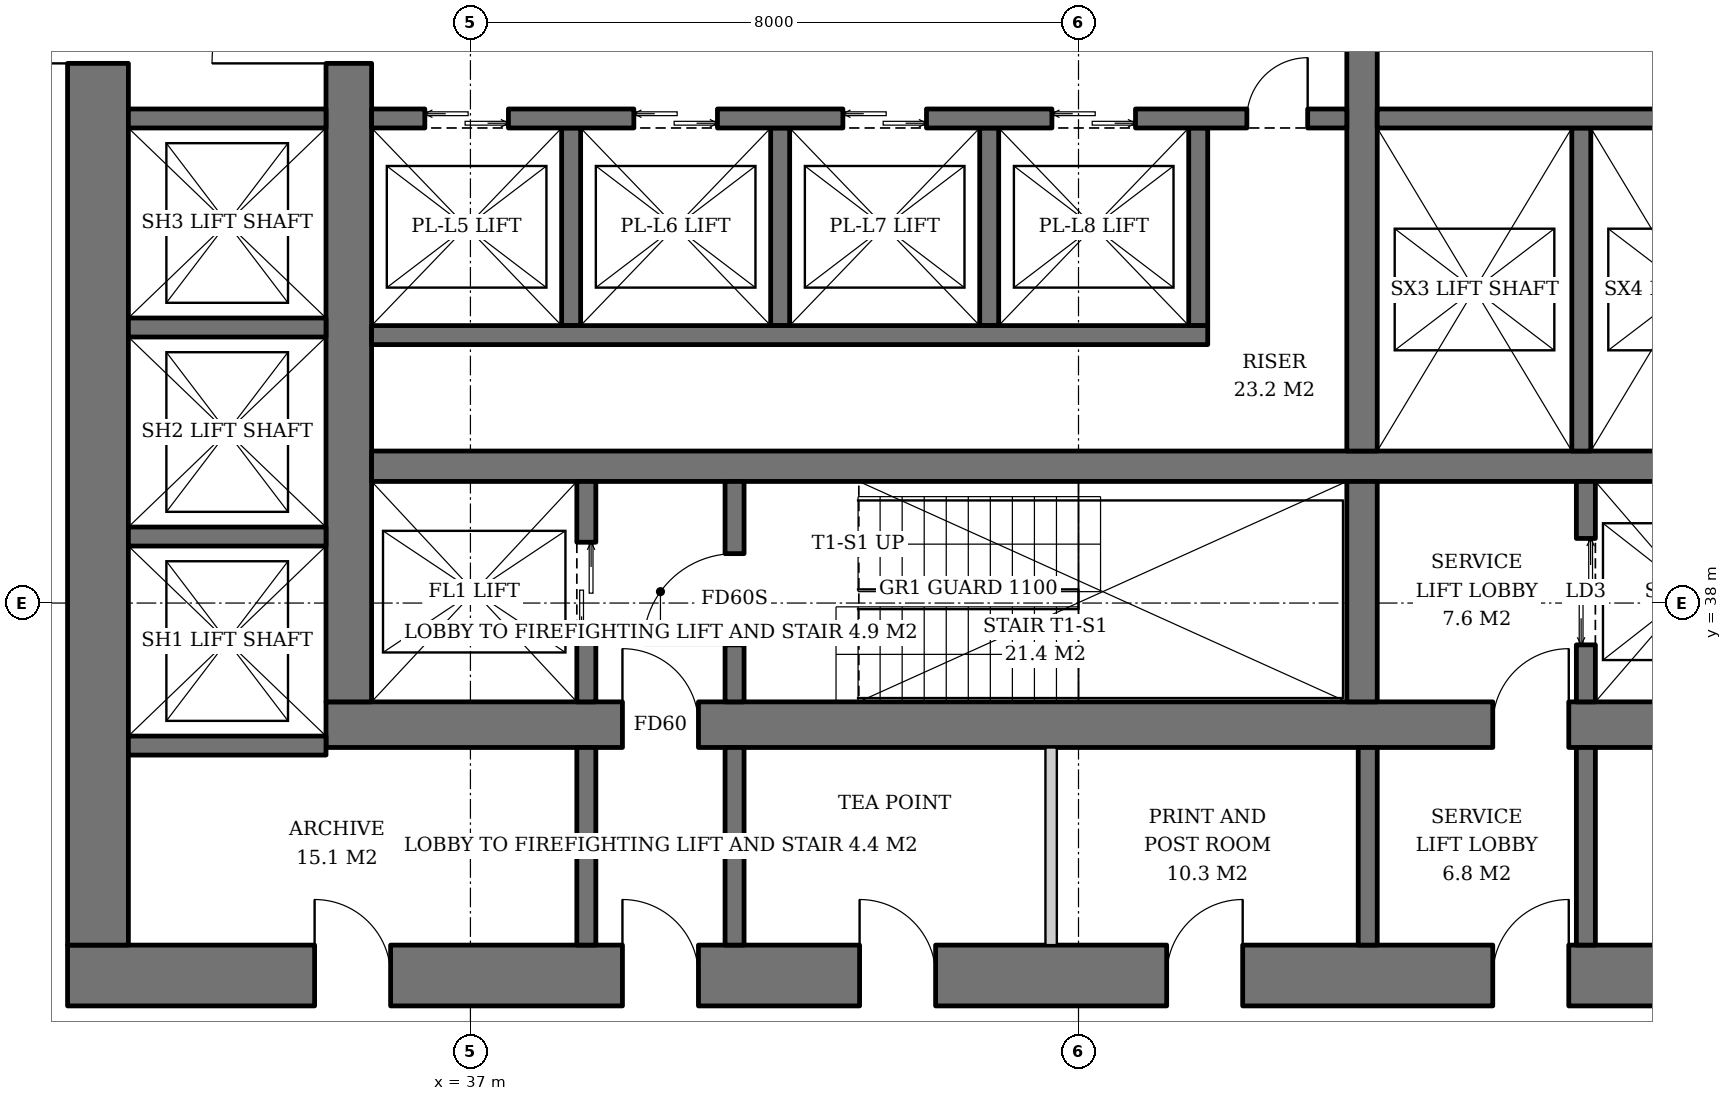
"""IFC4 building model, lengths in metres.
Left out: names, types, materials, properties, quantities, classifications, styles, units other than length and angle.
Written with IfcOpenShell. Run it as: python <this file> out.ifc"""

import sys

from ifc_helpers import new_model, si_unit, direction, frame, frame_2d, origin, place, context, subcontext, project, spatial, rectangle, extrude, element, fill, save


model = new_model("IFC4")
c1 = context("Model", 3, precision=1e-05, world=origin(), true_north=direction((0.0, 1.0)))
c2 = subcontext(c1, "Body", "Model", "MODEL_VIEW")
j1 = project(units=[si_unit("LENGTHUNIT", "METRE"), si_unit("PLANEANGLEUNIT", "RADIAN")], contexts=[c1])
p1 = place(None, origin())
s1 = spatial("IfcSite", under=j1, at=p1, CompositionType="ELEMENT")
p2 = place(p1, origin())
s2 = spatial("IfcBuilding", under=s1, at=p2, CompositionType="ELEMENT")
p3 = place(p2, frame((0.0, 0.0, 66.6)))
s3 = spatial("IfcBuildingStorey", under=s2, at=p3, CompositionType="ELEMENT", Elevation=66.6)
p4 = place(p3, frame((35.1, 36.4, 0.0), z_axis=(0.0, 0.0, 1.0), x_axis=(1.0, 0.0, 0.0)))
e1 = element("IfcWall", 1, at=p4, inside=s3, PredefinedType="SHEAR", context=c2, shape_type="SweptSolid", body=[
    extrude(rectangle(XDim=19.8, YDim=0.6, at=frame_2d((9.9, 0.0))), origin(), (0.0, 0.0, 1.0), 3.8),
])
p5 = place(p4, frame((3.9, 0.0, 0.0)))
e2 = element("IfcOpeningElement", 2, at=p5, cuts=e1, PredefinedType="OPENING", context=c2, shape_type="SweptSolid", body=[
    extrude(rectangle(XDim=1.0, YDim=2.1, at=frame_2d((0.5, 1.05))), frame((0.0, 0.31, 0.0), z_axis=(0.0, -1.0, 0.0), x_axis=(1.0, 0.0, 0.0)), (0.0, 0.0, 1.0), 0.62),
])
p6 = place(p4, frame((15.35, 0.0, 0.0)))
e3 = element("IfcOpeningElement", 3, at=p6, cuts=e1, PredefinedType="OPENING", context=c2, shape_type="SweptSolid", body=[
    extrude(rectangle(XDim=1.0, YDim=2.1, at=frame_2d((0.5, 1.05))), frame((0.0, 0.31, 0.0), z_axis=(0.0, -1.0, 0.0), x_axis=(1.0, 0.0, 0.0)), (0.0, 0.0, 1.0), 0.62),
])
p7 = place(p3, frame((35.4, 36.7, 0.0), z_axis=(0.0, 0.0, 1.0), x_axis=(0.0, 1.0, 0.0)))
e4 = element("IfcWall", 4, at=p7, inside=s3, PredefinedType="SHEAR", context=c2, shape_type="SweptSolid", body=[
    extrude(rectangle(XDim=18.6, YDim=0.6, at=frame_2d((9.3, 0.0))), origin(), (0.0, 0.0, 1.0), 3.8),
])
p8 = place(p7, frame((8.4, 0.0, 0.0)))
e5 = element("IfcOpeningElement", 5, at=p8, cuts=e4, PredefinedType="OPENING", context=c2, shape_type="SweptSolid", body=[
    extrude(rectangle(XDim=1.8, YDim=2.4, at=frame_2d((0.9, 1.2))), frame((0.0, 0.31, 0.0), z_axis=(0.0, -1.0, 0.0), x_axis=(1.0, 0.0, 0.0)), (0.0, 0.0, 1.0), 0.62),
])
p9 = place(p3, frame((31.7, 33.1, 0.0), z_axis=(0.0, 0.0, 1.0), x_axis=(1.0, 0.0, 0.0)))
e6 = element("IfcWall", 6, at=p9, inside=s3, PredefinedType="SHEAR", context=c2, shape_type="SweptSolid", body=[
    extrude(rectangle(XDim=26.6, YDim=0.8, at=frame_2d((13.3, 0.0))), origin(), (0.0, 0.0, 1.0), 3.8),
])
p10 = place(p9, frame((7.3, 0.0, 0.0)))
e7 = element("IfcOpeningElement", 7, at=p10, cuts=e6, PredefinedType="OPENING", context=c2, shape_type="SweptSolid", body=[
    extrude(rectangle(XDim=1.0, YDim=2.1, at=frame_2d((0.5, 1.05))), frame((0.0, 0.41, 0.0), z_axis=(0.0, -1.0, 0.0), x_axis=(1.0, 0.0, 0.0)), (0.0, 0.0, 1.0), 0.82),
])
p11 = place(p9, frame((18.75, 0.0, 0.0)))
e8 = element("IfcOpeningElement", 8, at=p11, cuts=e6, PredefinedType="OPENING", context=c2, shape_type="SweptSolid", body=[
    extrude(rectangle(XDim=1.0, YDim=2.1, at=frame_2d((0.5, 1.05))), frame((0.0, 0.41, 0.0), z_axis=(0.0, -1.0, 0.0), x_axis=(1.0, 0.0, 0.0)), (0.0, 0.0, 1.0), 0.82),
])
p12 = place(p9, frame((3.25, 0.0, 0.0)))
e9 = element("IfcOpeningElement", 9, at=p12, cuts=e6, PredefinedType="OPENING", context=c2, shape_type="SweptSolid", body=[
    extrude(rectangle(XDim=1.0, YDim=2.1, at=frame_2d((0.5, 1.05))), frame((0.0, 0.41, 0.0), z_axis=(0.0, -1.0, 0.0), x_axis=(1.0, 0.0, 0.0)), (0.0, 0.0, 1.0), 0.82),
])
p13 = place(p9, frame((10.42, 0.0, 0.0)))
e10 = element("IfcOpeningElement", 10, at=p13, cuts=e6, PredefinedType="OPENING", context=c2, shape_type="SweptSolid", body=[
    extrude(rectangle(XDim=1.0, YDim=2.1, at=frame_2d((0.5, 1.05))), frame((0.0, 0.41, 0.0), z_axis=(0.0, -1.0, 0.0), x_axis=(1.0, 0.0, 0.0)), (0.0, 0.0, 1.0), 0.82),
])
p14 = place(p9, frame((14.46, 0.0, 0.0)))
e11 = element("IfcOpeningElement", 11, at=p14, cuts=e6, PredefinedType="OPENING", context=c2, shape_type="SweptSolid", body=[
    extrude(rectangle(XDim=1.0, YDim=2.1, at=frame_2d((0.5, 1.05))), frame((0.0, 0.41, 0.0), z_axis=(0.0, -1.0, 0.0), x_axis=(1.0, 0.0, 0.0)), (0.0, 0.0, 1.0), 0.82),
])
p15 = place(p9, frame((22.45, 0.0, 0.0)))
e12 = element("IfcOpeningElement", 12, at=p15, cuts=e6, PredefinedType="OPENING", context=c2, shape_type="SweptSolid", body=[
    extrude(rectangle(XDim=1.0, YDim=2.1, at=frame_2d((0.5, 1.05))), frame((0.0, 0.41, 0.0), z_axis=(0.0, -1.0, 0.0), x_axis=(1.0, 0.0, 0.0)), (0.0, 0.0, 1.0), 0.82),
])
p16 = place(p3, frame((32.1, 33.5, 0.0), z_axis=(0.0, 0.0, 1.0), x_axis=(0.0, 1.0, 0.0)))
e13 = element("IfcWall", 13, at=p16, inside=s3, PredefinedType="SHEAR", context=c2, shape_type="SweptSolid", body=[
    extrude(rectangle(XDim=25.0, YDim=0.8, at=frame_2d((12.5, 0.0))), origin(), (0.0, 0.0, 1.0), 3.8),
])
p17 = place(p16, frame((11.6, 0.0, 0.0)))
e14 = element("IfcOpeningElement", 14, at=p17, cuts=e13, PredefinedType="OPENING", context=c2, shape_type="SweptSolid", body=[
    extrude(rectangle(XDim=1.8, YDim=2.4, at=frame_2d((0.9, 1.2))), frame((0.0, 0.41, 0.0), z_axis=(0.0, -1.0, 0.0), x_axis=(1.0, 0.0, 0.0)), (0.0, 0.0, 1.0), 0.82),
])
p18 = place(p3, frame((35.7, 39.8, 0.0), z_axis=(0.0, 0.0, 1.0), x_axis=(1.0, 0.0, 0.0)))
e15 = element("IfcWall", 15, at=p18, inside=s3, PredefinedType="SHEAR", context=c2, shape_type="SweptSolid", body=[
    extrude(rectangle(XDim=18.6, YDim=0.4, at=frame_2d((9.3, 0.0))), origin(), (0.0, 0.0, 1.0), 3.8),
])
p19 = place(p3, frame((48.73, 36.7, 0.0), z_axis=(0.0, 0.0, 1.0), x_axis=(0.0, 1.0, 0.0)))
e16 = element("IfcWall", 16, at=p19, inside=s3, PredefinedType="SHEAR", context=c2, shape_type="SweptSolid", body=[
    extrude(rectangle(XDim=2.9, YDim=0.4, at=frame_2d((1.45, 0.0))), origin(), (0.0, 0.0, 1.0), 3.8),
])
p20 = place(p3, frame((48.73, 40.0, 0.0), z_axis=(0.0, 0.0, 1.0), x_axis=(0.0, 1.0, 0.0)))
e17 = element("IfcWall", 17, at=p20, inside=s3, PredefinedType="SHEAR", context=c2, shape_type="SweptSolid", body=[
    extrude(rectangle(XDim=12.0, YDim=0.4, at=frame_2d((6.0, 0.0))), origin(), (0.0, 0.0, 1.0), 3.8),
])
p21 = place(p3, frame((38.525, 36.7, 0.0), z_axis=(0.0, 0.0, 1.0), x_axis=(0.0, 1.0, 0.0)))
e18 = element("IfcWall", 18, at=p21, inside=s3, PredefinedType="SHEAR", context=c2, shape_type="SweptSolid", body=[
    extrude(rectangle(XDim=2.9, YDim=0.25, at=frame_2d((1.45, 0.0))), origin(), (0.0, 0.0, 1.0), 3.8),
])
p22 = place(p21, frame((0.8, 0.0, 0.0)))
e19 = element("IfcOpeningElement", 19, at=p22, cuts=e18, PredefinedType="OPENING", context=c2, shape_type="SweptSolid", body=[
    extrude(rectangle(XDim=1.3, YDim=2.2, at=frame_2d((0.65, 1.1))), frame((0.0, 0.135, 0.0), z_axis=(0.0, -1.0, 0.0), x_axis=(1.0, 0.0, 0.0)), (0.0, 0.0, 1.0), 0.27),
])
p23 = place(p3, frame((40.475, 36.7, 0.0), z_axis=(0.0, 0.0, 1.0), x_axis=(0.0, 1.0, 0.0)))
e20 = element("IfcWall", 20, at=p23, inside=s3, PredefinedType="SHEAR", context=c2, shape_type="SweptSolid", body=[
    extrude(rectangle(XDim=2.9, YDim=0.25, at=frame_2d((1.45, 0.0))), origin(), (0.0, 0.0, 1.0), 3.8),
])
p24 = place(p23, frame((0.75, 0.0, 0.0)))
e21 = element("IfcOpeningElement", 21, at=p24, cuts=e20, PredefinedType="OPENING", context=c2, shape_type="SweptSolid", body=[
    extrude(rectangle(XDim=1.2, YDim=2.1, at=frame_2d((0.6, 1.05))), frame((0.0, 0.135, 0.0), z_axis=(0.0, -1.0, 0.0), x_axis=(1.0, 0.0, 0.0)), (0.0, 0.0, 1.0), 0.27),
])
p25 = place(p3, frame((51.675, 36.7, 0.0), z_axis=(0.0, 0.0, 1.0), x_axis=(0.0, 1.0, 0.0)))
e22 = element("IfcWall", 22, at=p25, inside=s3, PredefinedType="SHEAR", context=c2, shape_type="SweptSolid", body=[
    extrude(rectangle(XDim=2.9, YDim=0.25, at=frame_2d((1.45, 0.0))), origin(), (0.0, 0.0, 1.0), 3.8),
])
p26 = place(p25, frame((0.75, 0.0, 0.0)))
e23 = element("IfcOpeningElement", 23, at=p26, cuts=e22, PredefinedType="OPENING", context=c2, shape_type="SweptSolid", body=[
    extrude(rectangle(XDim=1.4, YDim=2.4, at=frame_2d((0.7, 1.2))), frame((0.0, 0.135, 0.0), z_axis=(0.0, -1.0, 0.0), x_axis=(1.0, 0.0, 0.0)), (0.0, 0.0, 1.0), 0.27),
])
for number, where, z_axis, x_axis in (
    (24, (38.325, 44.25, 0.0), (0.0, 0.0, 1.0), (0.0, -1.0, 0.0)),
    (25, (41.075, 44.25, 0.0), (0.0, 0.0, 1.0), (0.0, -1.0, 0.0)),
    (26, (43.825, 44.25, 0.0), (0.0, 0.0, 1.0), (0.0, -1.0, 0.0)),
    (27, (46.575, 44.25, 0.0), (0.0, 0.0, 1.0), (0.0, -1.0, 0.0)),
):
    element("IfcWall", number, at=place(p3, frame(where, z_axis=z_axis, x_axis=x_axis)), inside=s3, PredefinedType="SHEAR", context=c2, shape_type="SweptSolid", body=[
        extrude(rectangle(XDim=2.6, YDim=0.25, at=frame_2d((1.3, 0.0))), origin(), (0.0, 0.0, 1.0), 3.8),
    ])
p27 = place(p3, frame((35.7, 41.525, 0.0), z_axis=(0.0, 0.0, 1.0), x_axis=(1.0, 0.0, 0.0)))
e28 = element("IfcWall", 28, at=p27, inside=s3, PredefinedType="SHEAR", context=c2, shape_type="SweptSolid", body=[
    extrude(rectangle(XDim=11.0, YDim=0.25, at=frame_2d((5.5, 0.0))), origin(), (0.0, 0.0, 1.0), 3.8),
])
p28 = place(p3, frame((35.7, 44.375, 0.0), z_axis=(0.0, 0.0, 1.0), x_axis=(1.0, 0.0, 0.0)))
e29 = element("IfcWall", 29, at=p28, inside=s3, PredefinedType="SHEAR", context=c2, shape_type="SweptSolid", body=[
    extrude(rectangle(XDim=12.83, YDim=0.25, at=frame_2d((6.415, 0.0))), origin(), (0.0, 0.0, 1.0), 3.8),
])
p29 = place(p28, frame((0.7, 0.0, 0.0)))
e30 = element("IfcOpeningElement", 30, at=p29, cuts=e29, PredefinedType="OPENING", context=c2, shape_type="SweptSolid", body=[
    extrude(rectangle(XDim=1.1, YDim=2.2, at=frame_2d((0.55, 1.1))), frame((0.0, 0.135, 0.0), z_axis=(0.0, -1.0, 0.0), x_axis=(1.0, 0.0, 0.0)), (0.0, 0.0, 1.0), 0.27),
])
p30 = place(p28, frame((3.45, 0.0, 0.0)))
e31 = element("IfcOpeningElement", 31, at=p30, cuts=e29, PredefinedType="OPENING", context=c2, shape_type="SweptSolid", body=[
    extrude(rectangle(XDim=1.1, YDim=2.2, at=frame_2d((0.55, 1.1))), frame((0.0, 0.135, 0.0), z_axis=(0.0, -1.0, 0.0), x_axis=(1.0, 0.0, 0.0)), (0.0, 0.0, 1.0), 0.27),
])
p31 = place(p28, frame((6.2, 0.0, 0.0)))
e32 = element("IfcOpeningElement", 32, at=p31, cuts=e29, PredefinedType="OPENING", context=c2, shape_type="SweptSolid", body=[
    extrude(rectangle(XDim=1.1, YDim=2.2, at=frame_2d((0.55, 1.1))), frame((0.0, 0.135, 0.0), z_axis=(0.0, -1.0, 0.0), x_axis=(1.0, 0.0, 0.0)), (0.0, 0.0, 1.0), 0.27),
])
p32 = place(p28, frame((8.95, 0.0, 0.0)))
e33 = element("IfcOpeningElement", 33, at=p32, cuts=e29, PredefinedType="OPENING", context=c2, shape_type="SweptSolid", body=[
    extrude(rectangle(XDim=1.1, YDim=2.2, at=frame_2d((0.55, 1.1))), frame((0.0, 0.135, 0.0), z_axis=(0.0, -1.0, 0.0), x_axis=(1.0, 0.0, 0.0)), (0.0, 0.0, 1.0), 0.27),
])
p33 = place(p28, frame((11.515, 0.0, 0.0)))
e34 = element("IfcOpeningElement", 34, at=p33, cuts=e29, PredefinedType="OPENING", context=c2, shape_type="SweptSolid", body=[
    extrude(rectangle(XDim=0.8, YDim=2.0, at=frame_2d((0.4, 1.0))), frame((0.0, 0.135, 0.0), z_axis=(0.0, -1.0, 0.0), x_axis=(1.0, 0.0, 0.0)), (0.0, 0.0, 1.0), 0.27),
])
p34 = place(p3, frame((51.615, 44.25, 0.0), z_axis=(0.0, 0.0, 1.0), x_axis=(0.0, -1.0, 0.0)))
e35 = element("IfcWall", 35, at=p34, inside=s3, PredefinedType="SHEAR", context=c2, shape_type="SweptSolid", body=[
    extrude(rectangle(XDim=4.25, YDim=0.25, at=frame_2d((2.125, 0.0))), origin(), (0.0, 0.0, 1.0), 3.8),
])
p35 = place(p3, frame((48.93, 44.375, 0.0), z_axis=(0.0, 0.0, 1.0), x_axis=(1.0, 0.0, 0.0)))
e36 = element("IfcWall", 36, at=p35, inside=s3, PredefinedType="SHEAR", context=c2, shape_type="SweptSolid", body=[
    extrude(rectangle(XDim=5.37, YDim=0.25, at=frame_2d((2.685, 0.0))), origin(), (0.0, 0.0, 1.0), 3.8),
])
for number, where, z_axis, x_axis in (
    (37, (32.5, 36.125, 0.0), (0.0, 0.0, 1.0), (1.0, 0.0, 0.0)),
    (38, (32.5, 38.875, 0.0), (0.0, 0.0, 1.0), (1.0, 0.0, 0.0)),
    (39, (32.5, 41.625, 0.0), (0.0, 0.0, 1.0), (1.0, 0.0, 0.0)),
    (40, (32.5, 44.375, 0.0), (0.0, 0.0, 1.0), (1.0, 0.0, 0.0)),
):
    element("IfcWall", number, at=place(p3, frame(where, z_axis=z_axis, x_axis=x_axis)), inside=s3, PredefinedType="SHEAR", context=c2, shape_type="SweptSolid", body=[
        extrude(rectangle(XDim=2.6, YDim=0.25, at=frame_2d((1.3, 0.0))), origin(), (0.0, 0.0, 1.0), 3.8),
    ])
for number, where, z_axis, x_axis in (
    (41, (38.525, 33.5, 0.0), (0.0, 0.0, 1.0), (0.0, 1.0, 0.0)),
    (42, (40.475, 33.5, 0.0), (0.0, 0.0, 1.0), (0.0, 1.0, 0.0)),
    (43, (48.805, 33.5, 0.0), (0.0, 0.0, 1.0), (0.0, 1.0, 0.0)),
    (44, (51.675, 33.5, 0.0), (0.0, 0.0, 1.0), (0.0, 1.0, 0.0)),
):
    element("IfcWall", number, at=place(p3, frame(where, z_axis=z_axis, x_axis=x_axis)), inside=s3, PredefinedType="SOLIDWALL", context=c2, shape_type="SweptSolid", body=[
        extrude(rectangle(XDim=2.6, YDim=0.25, at=frame_2d((1.3, 0.0))), origin(), (0.0, 0.0, 1.0), 3.62),
    ])
p36 = place(p3, frame((44.64, 33.5, 0.0), z_axis=(0.0, 0.0, 1.0), x_axis=(0.0, 1.0, 0.0)))
e45 = element("IfcWall", 45, at=p36, inside=s3, PredefinedType="SOLIDWALL", context=c2, shape_type="SweptSolid", body=[
    extrude(rectangle(XDim=2.6, YDim=0.15, at=frame_2d((1.3, 0.0))), origin(), (0.0, 0.0, 1.0), 3.62),
])
p37 = place(p22, origin())
e46 = element("IfcDoor", 46, at=p37, inside=s3, OperationType="DOUBLE_DOOR_SLIDING", PredefinedType="DOOR", context=c2, shape_type="SweptSolid", body=[
    extrude(rectangle(XDim=1.3, YDim=2.2, at=frame_2d((0.65, 1.1))), frame((0.0, 0.025, 0.0), z_axis=(0.0, -1.0, 0.0), x_axis=(1.0, 0.0, 0.0)), (0.0, 0.0, 1.0), 0.05),
])
fill(e19, e46)
p38 = place(p24, origin())
e47 = element("IfcDoor", 47, at=p38, inside=s3, OperationType="SINGLE_SWING_LEFT", PredefinedType="DOOR", context=c2, shape_type="SweptSolid", body=[
    extrude(rectangle(XDim=1.2, YDim=2.1, at=frame_2d((0.6, 1.05))), frame((0.0, 0.025, 0.0), z_axis=(0.0, -1.0, 0.0), x_axis=(1.0, 0.0, 0.0)), (0.0, 0.0, 1.0), 0.05),
])
fill(e21, e47)
p39 = place(p26, origin())
e48 = element("IfcDoor", 48, at=p39, inside=s3, OperationType="DOUBLE_DOOR_SLIDING", PredefinedType="DOOR", context=c2, shape_type="SweptSolid", body=[
    extrude(rectangle(XDim=1.4, YDim=2.4, at=frame_2d((0.7, 1.2))), frame((0.0, 0.025, 0.0), z_axis=(0.0, -1.0, 0.0), x_axis=(1.0, 0.0, 0.0)), (0.0, 0.0, 1.0), 0.05),
])
fill(e23, e48)
p40 = place(p29, origin())
e49 = element("IfcDoor", 49, at=p40, inside=s3, OperationType="DOUBLE_DOOR_SLIDING", PredefinedType="DOOR", context=c2, shape_type="SweptSolid", body=[
    extrude(rectangle(XDim=1.1, YDim=2.2, at=frame_2d((0.55, 1.1))), frame((0.0, 0.025, 0.0), z_axis=(0.0, -1.0, 0.0), x_axis=(1.0, 0.0, 0.0)), (0.0, 0.0, 1.0), 0.05),
])
fill(e30, e49)
p41 = place(p30, origin())
e50 = element("IfcDoor", 50, at=p41, inside=s3, OperationType="DOUBLE_DOOR_SLIDING", PredefinedType="DOOR", context=c2, shape_type="SweptSolid", body=[
    extrude(rectangle(XDim=1.1, YDim=2.2, at=frame_2d((0.55, 1.1))), frame((0.0, 0.025, 0.0), z_axis=(0.0, -1.0, 0.0), x_axis=(1.0, 0.0, 0.0)), (0.0, 0.0, 1.0), 0.05),
])
fill(e31, e50)
p42 = place(p31, origin())
e51 = element("IfcDoor", 51, at=p42, inside=s3, OperationType="DOUBLE_DOOR_SLIDING", PredefinedType="DOOR", context=c2, shape_type="SweptSolid", body=[
    extrude(rectangle(XDim=1.1, YDim=2.2, at=frame_2d((0.55, 1.1))), frame((0.0, 0.025, 0.0), z_axis=(0.0, -1.0, 0.0), x_axis=(1.0, 0.0, 0.0)), (0.0, 0.0, 1.0), 0.05),
])
fill(e32, e51)
p43 = place(p32, origin())
e52 = element("IfcDoor", 52, at=p43, inside=s3, OperationType="DOUBLE_DOOR_SLIDING", PredefinedType="DOOR", context=c2, shape_type="SweptSolid", body=[
    extrude(rectangle(XDim=1.1, YDim=2.2, at=frame_2d((0.55, 1.1))), frame((0.0, 0.025, 0.0), z_axis=(0.0, -1.0, 0.0), x_axis=(1.0, 0.0, 0.0)), (0.0, 0.0, 1.0), 0.05),
])
fill(e33, e52)
p44 = place(p33, origin())
e53 = element("IfcDoor", 53, at=p44, inside=s3, OperationType="SINGLE_SWING_RIGHT", PredefinedType="DOOR", context=c2, shape_type="SweptSolid", body=[
    extrude(rectangle(XDim=0.8, YDim=2.0, at=frame_2d((0.4, 1.0))), frame((0.0, 0.025, 0.0), z_axis=(0.0, -1.0, 0.0), x_axis=(1.0, 0.0, 0.0)), (0.0, 0.0, 1.0), 0.05),
])
fill(e34, e53)
p45 = place(p5, origin())
e54 = element("IfcDoor", 54, at=p45, inside=s3, OperationType="SINGLE_SWING_LEFT", PredefinedType="DOOR", context=c2, shape_type="SweptSolid", body=[
    extrude(rectangle(XDim=1.0, YDim=2.1, at=frame_2d((0.5, 1.05))), frame((0.0, 0.025, 0.0), z_axis=(0.0, -1.0, 0.0), x_axis=(1.0, 0.0, 0.0)), (0.0, 0.0, 1.0), 0.05),
])
fill(e2, e54)
p46 = place(p8, origin())
e55 = element("IfcDoor", 55, at=p46, inside=s3, OperationType="DOUBLE_DOOR_SINGLE_SWING", PredefinedType="DOOR", context=c2, shape_type="SweptSolid", body=[
    extrude(rectangle(XDim=1.8, YDim=2.4, at=frame_2d((0.9, 1.2))), frame((0.0, 0.025, 0.0), z_axis=(0.0, -1.0, 0.0), x_axis=(1.0, 0.0, 0.0)), (0.0, 0.0, 1.0), 0.05),
])
fill(e5, e55)
p47 = place(p6, origin())
e56 = element("IfcDoor", 56, at=p47, inside=s3, OperationType="SINGLE_SWING_RIGHT", PredefinedType="DOOR", context=c2, shape_type="SweptSolid", body=[
    extrude(rectangle(XDim=1.0, YDim=2.1, at=frame_2d((0.5, 1.05))), frame((0.0, 0.025, 0.0), z_axis=(0.0, -1.0, 0.0), x_axis=(1.0, 0.0, 0.0)), (0.0, 0.0, 1.0), 0.05),
])
fill(e3, e56)
p48 = place(p17, origin())
e57 = element("IfcDoor", 57, at=p48, inside=s3, OperationType="DOUBLE_DOOR_SINGLE_SWING", PredefinedType="DOOR", context=c2, shape_type="SweptSolid", body=[
    extrude(rectangle(XDim=1.8, YDim=2.4, at=frame_2d((0.9, 1.2))), frame((0.0, 0.025, 0.0), z_axis=(0.0, -1.0, 0.0), x_axis=(1.0, 0.0, 0.0)), (0.0, 0.0, 1.0), 0.05),
])
fill(e14, e57)
p49 = place(p10, origin())
e58 = element("IfcDoor", 58, at=p49, inside=s3, OperationType="SINGLE_SWING_LEFT", PredefinedType="DOOR", context=c2, shape_type="SweptSolid", body=[
    extrude(rectangle(XDim=1.0, YDim=2.1, at=frame_2d((0.5, 1.05))), frame((0.0, 0.025, 0.0), z_axis=(0.0, -1.0, 0.0), x_axis=(1.0, 0.0, 0.0)), (0.0, 0.0, 1.0), 0.05),
])
fill(e7, e58)
p50 = place(p11, origin())
e59 = element("IfcDoor", 59, at=p50, inside=s3, OperationType="SINGLE_SWING_RIGHT", PredefinedType="DOOR", context=c2, shape_type="SweptSolid", body=[
    extrude(rectangle(XDim=1.0, YDim=2.1, at=frame_2d((0.5, 1.05))), frame((0.0, 0.025, 0.0), z_axis=(0.0, -1.0, 0.0), x_axis=(1.0, 0.0, 0.0)), (0.0, 0.0, 1.0), 0.05),
])
fill(e8, e59)
p51 = place(p12, origin())
e60 = element("IfcDoor", 60, at=p51, inside=s3, OperationType="SINGLE_SWING_LEFT", PredefinedType="DOOR", context=c2, shape_type="SweptSolid", body=[
    extrude(rectangle(XDim=1.0, YDim=2.1, at=frame_2d((0.5, 1.05))), frame((0.0, 0.39, 0.0), z_axis=(0.0, -1.0, 0.0), x_axis=(1.0, 0.0, 0.0)), (0.0, 0.0, 1.0), 0.05),
])
fill(e9, e60)
p52 = place(p13, origin())
e61 = element("IfcDoor", 61, at=p52, inside=s3, OperationType="SINGLE_SWING_LEFT", PredefinedType="DOOR", context=c2, shape_type="SweptSolid", body=[
    extrude(rectangle(XDim=1.0, YDim=2.1, at=frame_2d((0.5, 1.05))), frame((0.0, 0.39, 0.0), z_axis=(0.0, -1.0, 0.0), x_axis=(1.0, 0.0, 0.0)), (0.0, 0.0, 1.0), 0.05),
])
fill(e10, e61)
p53 = place(p14, origin())
e62 = element("IfcDoor", 62, at=p53, inside=s3, OperationType="SINGLE_SWING_RIGHT", PredefinedType="DOOR", context=c2, shape_type="SweptSolid", body=[
    extrude(rectangle(XDim=1.0, YDim=2.1, at=frame_2d((0.5, 1.05))), frame((0.0, 0.39, 0.0), z_axis=(0.0, -1.0, 0.0), x_axis=(1.0, 0.0, 0.0)), (0.0, 0.0, 1.0), 0.05),
])
fill(e11, e62)
save(model, sys.argv[1])
